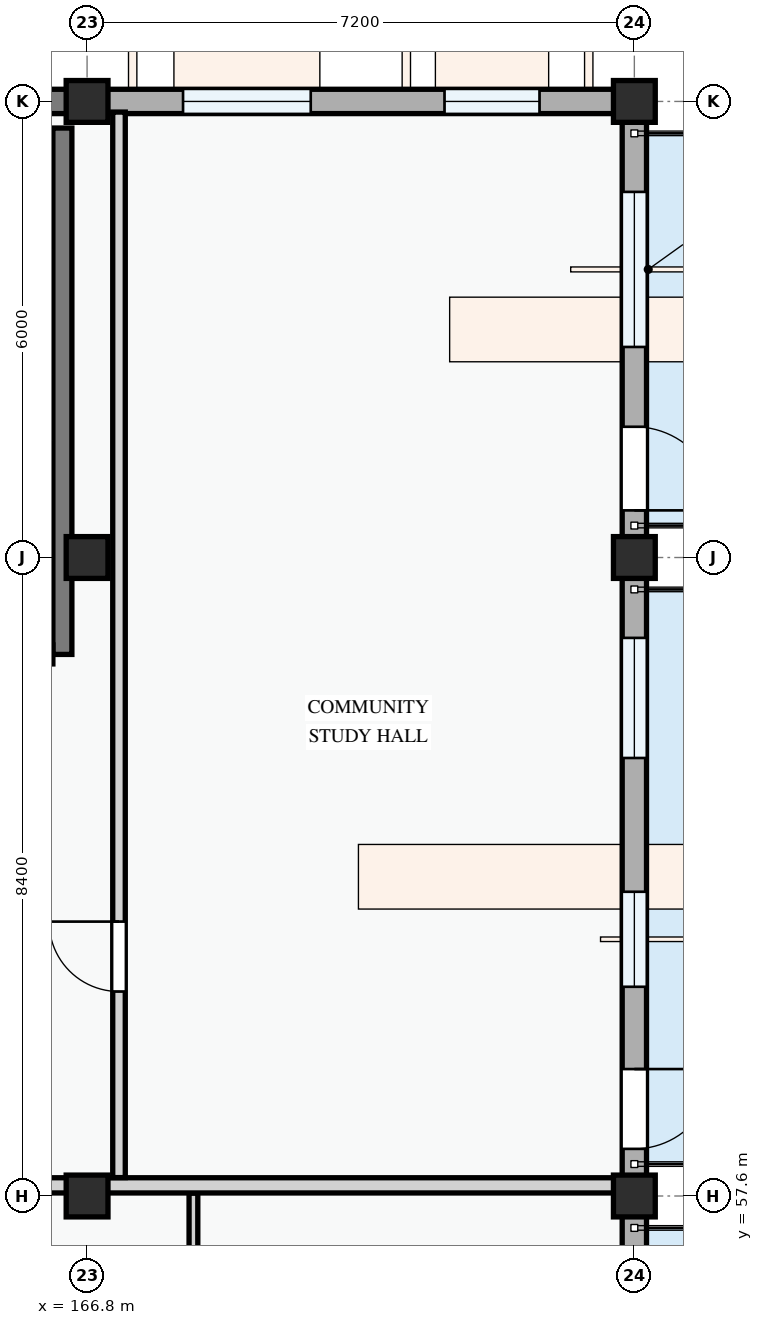
"""IFC4 building model, lengths in metres.
Left out: names, types, materials, properties, quantities, classifications, styles, units other than length and angle.
Written with IfcOpenShell. Run it as: python <this file> out.ifc"""

import sys

from ifc_helpers import new_model, si_unit, direction, frame, frame_2d, origin, origin_2d, place, context, subcontext, project, spatial, rectangle, extrude, element, fill, save


model = new_model("IFC4")
c1 = context("Model", 3, precision=1e-05, world=origin(), true_north=direction((0.0, 1.0)))
c2 = subcontext(c1, "Body", "Model", "MODEL_VIEW")
j1 = project(units=[si_unit("LENGTHUNIT", "METRE"), si_unit("PLANEANGLEUNIT", "RADIAN")], contexts=[c1])
p1 = place(None, origin())
s1 = spatial("IfcSite", under=j1, at=p1, CompositionType="ELEMENT")
p2 = place(p1, origin())
s2 = spatial("IfcBuilding", under=s1, at=p2, CompositionType="ELEMENT")
p3 = place(p2, frame((0.0, 0.0, 11.4)))
s3 = spatial("IfcBuildingStorey", under=s2, at=p3, CompositionType="ELEMENT", Elevation=11.4)
for number, where, z_axis, x_axis in (
    (1, (166.8, 57.6, 0.0), (0.0, 0.0, 1.0), (1.0, 0.0, 0.0)),
    (2, (166.8, 66.0, 0.0), (0.0, 0.0, 1.0), (1.0, 0.0, 0.0)),
    (3, (166.8, 72.0, 0.0), (0.0, 0.0, 1.0), (1.0, 0.0, 0.0)),
    (4, (174.0, 57.6, 0.0), (0.0, 0.0, 1.0), (1.0, 0.0, 0.0)),
    (5, (174.0, 66.0, 0.0), (0.0, 0.0, 1.0), (1.0, 0.0, 0.0)),
    (6, (174.0, 72.0, 0.0), (0.0, 0.0, 1.0), (1.0, 0.0, 0.0)),
):
    element("IfcColumn", number, at=place(p3, frame(where, z_axis=z_axis, x_axis=x_axis)), inside=s3, PredefinedType="COLUMN", context=c2, shape_type="SweptSolid", body=[
        extrude(rectangle(XDim=0.55, YDim=0.55, at=origin_2d()), origin(), (0.0, 0.0, 1.0), 3.3),
    ])
p4 = place(p3, frame((174.0, 51.6, 0.0), z_axis=(0.0, 0.0, 1.0), x_axis=(0.0, 1.0, 0.0)))
e7 = element("IfcWall", 7, at=p4, inside=s3, PredefinedType="STANDARD", context=c2, shape_type="SweptSolid", body=[
    extrude(rectangle(XDim=6.0, YDim=0.32, at=frame_2d((3.0, 0.0))), origin(), (0.0, 0.0, 1.0), 2.575),
])
p5 = place(p4, frame((0.62, 0.0, 0.0)))
e8 = element("IfcOpeningElement", 8, at=p5, cuts=e7, PredefinedType="OPENING", context=c2, shape_type="SweptSolid", body=[
    extrude(rectangle(XDim=1.6, YDim=2.2, at=frame_2d((0.8, 1.1))), frame((0.0, 0.17, 0.0), z_axis=(0.0, -1.0, 0.0), x_axis=(1.0, 0.0, 0.0)), (0.0, 0.0, 1.0), 0.34),
])
p6 = place(p4, frame((3.08, 0.0, 0.78)))
e9 = element("IfcOpeningElement", 9, at=p6, cuts=e7, PredefinedType="OPENING", context=c2, shape_type="SweptSolid", body=[
    extrude(rectangle(XDim=1.92, YDim=1.44, at=frame_2d((0.96, 0.72))), frame((0.0, 0.17, 0.0), z_axis=(0.0, -1.0, 0.0), x_axis=(1.0, 0.0, 0.0)), (0.0, 0.0, 1.0), 0.34),
])
p7 = place(p3, frame((174.0, 57.6, 0.0), z_axis=(0.0, 0.0, 1.0), x_axis=(0.0, 1.0, 0.0)))
e10 = element("IfcWall", 10, at=p7, inside=s3, PredefinedType="STANDARD", context=c2, shape_type="SweptSolid", body=[
    extrude(rectangle(XDim=8.4, YDim=0.32, at=frame_2d((4.2, 0.0))), origin(), (0.0, 0.0, 1.0), 2.425),
])
p8 = place(p7, frame((0.62, 0.0, 0.0)))
e11 = element("IfcOpeningElement", 11, at=p8, cuts=e10, PredefinedType="OPENING", context=c2, shape_type="SweptSolid", body=[
    extrude(rectangle(XDim=1.05, YDim=2.15, at=frame_2d((0.525, 1.075))), frame((0.0, 0.17, 0.0), z_axis=(0.0, -1.0, 0.0), x_axis=(1.0, 0.0, 0.0)), (0.0, 0.0, 1.0), 0.34),
])
p9 = place(p7, frame((2.752, 0.0, 0.78)))
e12 = element("IfcOpeningElement", 12, at=p9, cuts=e10, PredefinedType="OPENING", context=c2, shape_type="SweptSolid", body=[
    extrude(rectangle(XDim=1.25, YDim=1.3, at=frame_2d((0.625, 0.65))), frame((0.0, 0.17, 0.0), z_axis=(0.0, -1.0, 0.0), x_axis=(1.0, 0.0, 0.0)), (0.0, 0.0, 1.0), 0.34),
])
p10 = place(p7, frame((5.762, 0.0, 0.78)))
e13 = element("IfcOpeningElement", 13, at=p10, cuts=e10, PredefinedType="OPENING", context=c2, shape_type="SweptSolid", body=[
    extrude(rectangle(XDim=1.58, YDim=1.48, at=frame_2d((0.79, 0.74))), frame((0.0, 0.17, 0.0), z_axis=(0.0, -1.0, 0.0), x_axis=(1.0, 0.0, 0.0)), (0.0, 0.0, 1.0), 0.34),
])
p11 = place(p3, frame((174.0, 66.0, 0.0), z_axis=(0.0, 0.0, 1.0), x_axis=(0.0, 1.0, 0.0)))
e14 = element("IfcWall", 14, at=p11, inside=s3, PredefinedType="STANDARD", context=c2, shape_type="SweptSolid", body=[
    extrude(rectangle(XDim=6.0, YDim=0.32, at=frame_2d((3.0, 0.0))), origin(), (0.0, 0.0, 1.0), 2.575),
])
p12 = place(p11, frame((0.62, 0.0, 0.0)))
e15 = element("IfcOpeningElement", 15, at=p12, cuts=e14, PredefinedType="OPENING", context=c2, shape_type="SweptSolid", body=[
    extrude(rectangle(XDim=1.1, YDim=2.15, at=frame_2d((0.55, 1.075))), frame((0.0, 0.17, 0.0), z_axis=(0.0, -1.0, 0.0), x_axis=(1.0, 0.0, 0.0)), (0.0, 0.0, 1.0), 0.34),
])
p13 = place(p11, frame((2.77, 0.0, 0.78)))
e16 = element("IfcOpeningElement", 16, at=p13, cuts=e14, PredefinedType="OPENING", context=c2, shape_type="SweptSolid", body=[
    extrude(rectangle(XDim=2.04, YDim=1.46, at=frame_2d((1.02, 0.73))), frame((0.0, 0.17, 0.0), z_axis=(0.0, -1.0, 0.0), x_axis=(1.0, 0.0, 0.0)), (0.0, 0.0, 1.0), 0.34),
])
p14 = place(p3, frame((174.0, 72.0, 0.0), z_axis=(0.0, 0.0, 1.0), x_axis=(-1.0, 0.0, 0.0)))
e17 = element("IfcWall", 17, at=p14, inside=s3, PredefinedType="STANDARD", context=c2, shape_type="SweptSolid", body=[
    extrude(rectangle(XDim=7.2, YDim=0.32, at=frame_2d((3.6, 0.0))), origin(), (0.0, 0.0, 1.0), 2.375),
])
p15 = place(p14, frame((1.248, 0.0, 0.78)))
e18 = element("IfcOpeningElement", 18, at=p15, cuts=e17, PredefinedType="OPENING", context=c2, shape_type="SweptSolid", body=[
    extrude(rectangle(XDim=1.25, YDim=1.45, at=frame_2d((0.625, 0.725))), frame((0.0, 0.17, 0.0), z_axis=(0.0, -1.0, 0.0), x_axis=(1.0, 0.0, 0.0)), (0.0, 0.0, 1.0), 0.34),
])
p16 = place(p14, frame((4.258, 0.0, 0.78)))
e19 = element("IfcOpeningElement", 19, at=p16, cuts=e17, PredefinedType="OPENING", context=c2, shape_type="SweptSolid", body=[
    extrude(rectangle(XDim=1.68, YDim=1.46, at=frame_2d((0.84, 0.73))), frame((0.0, 0.17, 0.0), z_axis=(0.0, -1.0, 0.0), x_axis=(1.0, 0.0, 0.0)), (0.0, 0.0, 1.0), 0.34),
])
p17 = place(p3, frame((166.8, 72.0, 0.0), z_axis=(0.0, 0.0, 1.0), x_axis=(-1.0, 0.0, 0.0)))
e20 = element("IfcWall", 20, at=p17, inside=s3, PredefinedType="STANDARD", context=c2, shape_type="SweptSolid", body=[
    extrude(rectangle(XDim=0.65, YDim=0.32, at=frame_2d((0.325, 0.0))), origin(), (0.0, 0.0, 1.0), 3.04),
])
p18 = place(p3, frame((166.475, 71.65, 0.0), z_axis=(0.0, 0.0, 1.0), x_axis=(0.0, -1.0, 0.0)))
e21 = element("IfcWall", 21, at=p18, inside=s3, PredefinedType="SHEAR", context=c2, shape_type="SweptSolid", body=[
    extrude(rectangle(XDim=6.925, YDim=0.25, at=frame_2d((3.462, 0.0))), origin(), (0.0, 0.0, 1.0), 3.0),
])
p19 = place(p3, frame((168.199, 49.89, 0.0), z_axis=(0.0, 0.0, 1.0), x_axis=(0.0, 1.0, 0.0)))
e22 = element("IfcWall", 22, at=p19, inside=s3, PredefinedType="PARTITIONING", context=c2, shape_type="SweptSolid", body=[
    extrude(rectangle(XDim=7.748, YDim=0.115, at=frame_2d((3.874, 0.0))), origin(), (0.0, 0.0, 1.0), 3.0),
])
p20 = place(p3, frame((162.057, 57.74, 0.0), z_axis=(0.0, 0.0, 1.0), x_axis=(1.0, 0.0, 0.0)))
e23 = element("IfcWall", 23, at=p20, inside=s3, PredefinedType="PARTITIONING", context=c2, shape_type="SweptSolid", body=[
    extrude(rectangle(XDim=11.781, YDim=0.2, at=frame_2d((5.891, 0.0))), origin(), (0.0, 0.0, 1.0), 2.375),
])
p21 = place(p3, frame((167.22, 57.842, 0.0), z_axis=(0.0, 0.0, 1.0), x_axis=(0.0, 1.0, 0.0)))
e24 = element("IfcWall", 24, at=p21, inside=s3, PredefinedType="PARTITIONING", context=c2, shape_type="SweptSolid", body=[
    extrude(rectangle(XDim=14.018, YDim=0.165, at=frame_2d((7.009, 0.0))), origin(), (0.0, 0.0, 1.0), 2.425),
])
p22 = place(p21, frame((2.448, 0.0, 0.0)))
e25 = element("IfcOpeningElement", 25, at=p22, cuts=e24, PredefinedType="OPENING", context=c2, shape_type="SweptSolid", body=[
    extrude(rectangle(XDim=0.92, YDim=2.1, at=frame_2d((0.46, 1.05))), frame((0.0, 0.093, 0.0), z_axis=(0.0, -1.0, 0.0), x_axis=(1.0, 0.0, 0.0)), (0.0, 0.0, 1.0), 0.185),
])
p23 = place(p8, frame((1.05, 0.0, 0.0), z_axis=(0.0, 0.0, 1.0), x_axis=(-1.0, 0.0, 0.0)))
e26 = element("IfcDoor", 26, at=p23, inside=s3, OperationType="SINGLE_SWING_LEFT", PredefinedType="DOOR", context=c2, shape_type="SweptSolid", body=[
    extrude(rectangle(XDim=1.05, YDim=2.15, at=frame_2d((0.525, 1.075))), frame((0.0, 0.025, 0.0), z_axis=(0.0, -1.0, 0.0), x_axis=(1.0, 0.0, 0.0)), (0.0, 0.0, 1.0), 0.05),
])
fill(e11, e26)
p24 = place(p9, origin())
e27 = element("IfcWindow", 27, at=p24, inside=s3, PartitioningType="SINGLE_PANEL", PredefinedType="WINDOW", context=c2, shape_type="SweptSolid", body=[
    extrude(rectangle(XDim=1.25, YDim=1.3, at=frame_2d((0.625, 0.65))), frame((0.0, 0.03, 0.0), z_axis=(0.0, -1.0, 0.0), x_axis=(1.0, 0.0, 0.0)), (0.0, 0.0, 1.0), 0.06),
])
fill(e12, e27)
p25 = place(p10, origin())
e28 = element("IfcWindow", 28, at=p25, inside=s3, PartitioningType="SINGLE_PANEL", PredefinedType="WINDOW", context=c2, shape_type="SweptSolid", body=[
    extrude(rectangle(XDim=1.58, YDim=1.48, at=frame_2d((0.79, 0.74))), frame((0.0, 0.03, 0.0), z_axis=(0.0, -1.0, 0.0), x_axis=(1.0, 0.0, 0.0)), (0.0, 0.0, 1.0), 0.06),
])
fill(e13, e28)
p26 = place(p12, frame((1.1, 0.0, 0.0), z_axis=(0.0, 0.0, 1.0), x_axis=(-1.0, 0.0, 0.0)))
e29 = element("IfcDoor", 29, at=p26, inside=s3, OperationType="SINGLE_SWING_RIGHT", PredefinedType="DOOR", context=c2, shape_type="SweptSolid", body=[
    extrude(rectangle(XDim=1.1, YDim=2.15, at=frame_2d((0.55, 1.075))), frame((0.0, 0.025, 0.0), z_axis=(0.0, -1.0, 0.0), x_axis=(1.0, 0.0, 0.0)), (0.0, 0.0, 1.0), 0.05),
])
fill(e15, e29)
p27 = place(p13, origin())
e30 = element("IfcWindow", 30, at=p27, inside=s3, PartitioningType="DOUBLE_PANEL_VERTICAL", PredefinedType="WINDOW", context=c2, shape_type="SweptSolid", body=[
    extrude(rectangle(XDim=2.04, YDim=1.46, at=frame_2d((1.02, 0.73))), frame((0.0, 0.03, 0.0), z_axis=(0.0, -1.0, 0.0), x_axis=(1.0, 0.0, 0.0)), (0.0, 0.0, 1.0), 0.06),
])
fill(e16, e30)
p28 = place(p15, origin())
e31 = element("IfcWindow", 31, at=p28, inside=s3, PartitioningType="SINGLE_PANEL", PredefinedType="WINDOW", context=c2, shape_type="SweptSolid", body=[
    extrude(rectangle(XDim=1.25, YDim=1.45, at=frame_2d((0.625, 0.725))), frame((0.0, 0.03, 0.0), z_axis=(0.0, -1.0, 0.0), x_axis=(1.0, 0.0, 0.0)), (0.0, 0.0, 1.0), 0.06),
])
fill(e18, e31)
p29 = place(p16, origin())
e32 = element("IfcWindow", 32, at=p29, inside=s3, PartitioningType="DOUBLE_PANEL_VERTICAL", PredefinedType="WINDOW", context=c2, shape_type="SweptSolid", body=[
    extrude(rectangle(XDim=1.68, YDim=1.46, at=frame_2d((0.84, 0.73))), frame((0.0, 0.03, 0.0), z_axis=(0.0, -1.0, 0.0), x_axis=(1.0, 0.0, 0.0)), (0.0, 0.0, 1.0), 0.06),
])
fill(e19, e32)
p30 = place(p22, origin())
e33 = element("IfcDoor", 33, at=p30, inside=s3, OperationType="SINGLE_SWING_RIGHT", PredefinedType="DOOR", context=c2, shape_type="SweptSolid", body=[
    extrude(rectangle(XDim=0.92, YDim=2.1, at=frame_2d((0.46, 1.05))), frame((0.0, 0.025, 0.0), z_axis=(0.0, -1.0, 0.0), x_axis=(1.0, 0.0, 0.0)), (0.0, 0.0, 1.0), 0.05),
])
fill(e25, e33)
save(model, sys.argv[1])
